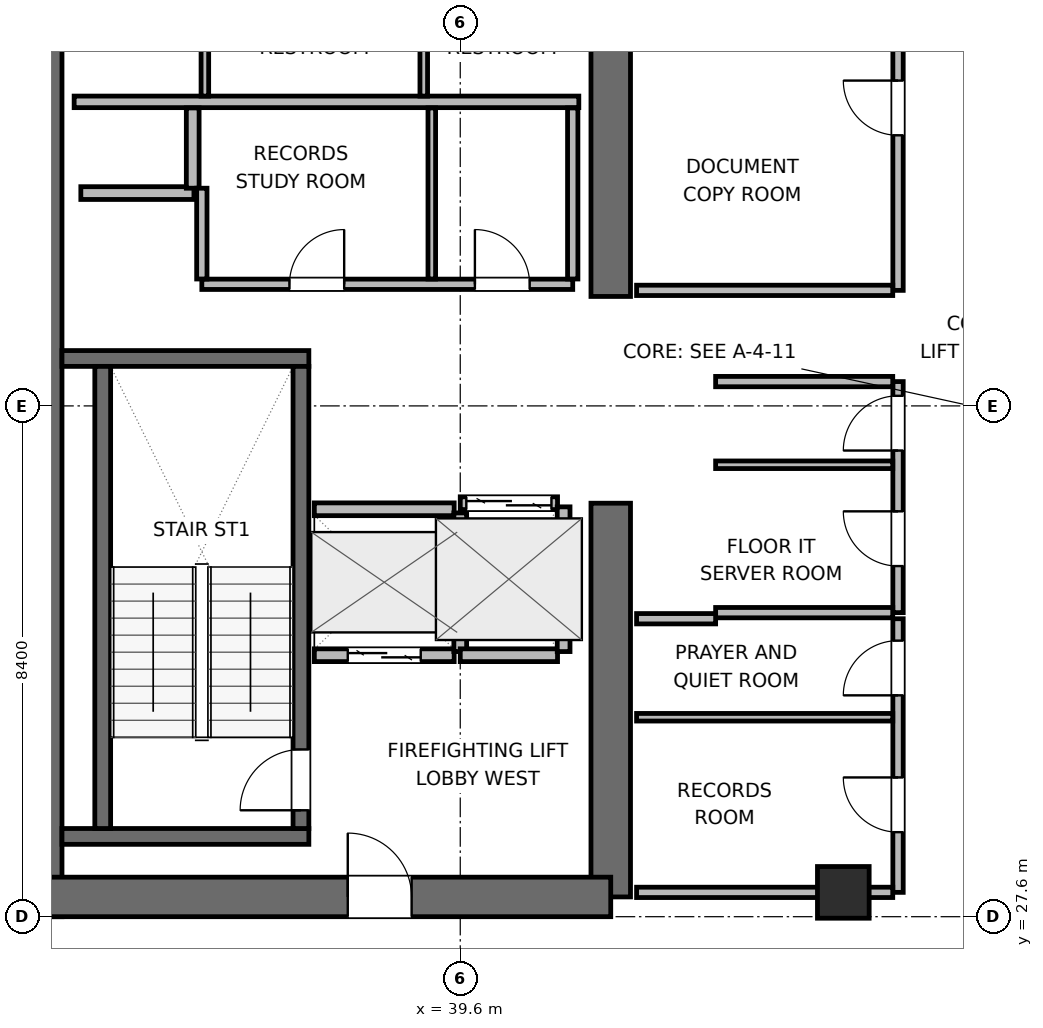
"""IFC4 building model, lengths in metres.
Left out: names, types, materials, properties, quantities, classifications, styles, units other than length and angle.
Written with IfcOpenShell. Run it as: python <this file> out.ifc"""

import sys

from ifc_helpers import new_model, si_unit, direction, frame, frame_2d, origin, origin_2d, place, context, subcontext, project, spatial, rectangle, extrude, element, fill, save


model = new_model("IFC4")
c1 = context("Model", 3, precision=1e-05, world=origin(), true_north=direction((0.0, 1.0)))
c2 = subcontext(c1, "Body", "Model", "MODEL_VIEW")
j1 = project(units=[si_unit("LENGTHUNIT", "METRE"), si_unit("PLANEANGLEUNIT", "RADIAN")], contexts=[c1])
p1 = place(None, origin())
s1 = spatial("IfcSite", under=j1, at=p1, CompositionType="ELEMENT")
p2 = place(p1, origin())
s2 = spatial("IfcBuilding", under=s1, at=p2, CompositionType="ELEMENT")
p3 = place(p2, frame((0.0, 0.0, 231.0)))
s3 = spatial("IfcBuildingStorey", under=s2, at=p3, CompositionType="ELEMENT", Elevation=231.0)
p4 = place(p3, frame((32.725, 27.6, 0.0), z_axis=(0.0, 0.0, 1.0), x_axis=(0.0, 1.0, 0.0)))
e1 = element("IfcWall", 1, at=p4, inside=s3, PredefinedType="SHEAR", context=c2, shape_type="SweptSolid", body=[
    extrude(rectangle(XDim=16.8, YDim=0.65, at=frame_2d((8.4, 0.0))), origin(), (0.0, 0.0, 1.0), 3.9),
])
p5 = place(p3, frame((42.075, 27.925, 0.0), z_axis=(0.0, 0.0, 1.0), x_axis=(0.0, 1.0, 0.0)))
e2 = element("IfcWall", 2, at=p5, inside=s3, PredefinedType="SHEAR", context=c2, shape_type="SweptSolid", body=[
    extrude(rectangle(XDim=6.475, YDim=0.65, at=frame_2d((3.237, 0.0))), origin(), (0.0, 0.0, 1.0), 3.9),
])
p6 = place(p3, frame((42.075, 37.8, 0.0), z_axis=(0.0, 0.0, 1.0), x_axis=(0.0, 1.0, 0.0)))
e3 = element("IfcWall", 3, at=p6, inside=s3, PredefinedType="SHEAR", context=c2, shape_type="SweptSolid", body=[
    extrude(rectangle(XDim=6.275, YDim=0.65, at=frame_2d((3.137, 0.0))), origin(), (0.0, 0.0, 1.0), 3.9),
])
p7 = place(p3, frame((32.725, 27.925, 0.0), z_axis=(0.0, 0.0, 1.0), x_axis=(1.0, 0.0, 0.0)))
e4 = element("IfcWall", 4, at=p7, inside=s3, PredefinedType="SHEAR", context=c2, shape_type="SweptSolid", body=[
    extrude(rectangle(XDim=9.35, YDim=0.65, at=frame_2d((4.675, 0.0))), origin(), (0.0, 0.0, 1.0), 3.9),
])
p8 = place(p7, frame((5.025, 0.0, 0.0)))
e5 = element("IfcOpeningElement", 5, at=p8, cuts=e4, PredefinedType="OPENING", context=c2, shape_type="SweptSolid", body=[
    extrude(rectangle(XDim=1.05, YDim=2.04, at=frame_2d((0.525, 1.02))), frame((0.0, 0.335, 0.0), z_axis=(0.0, -1.0, 0.0), x_axis=(1.0, 0.0, 0.0)), (0.0, 0.0, 1.0), 0.67),
])
for number, where, z_axis, x_axis in (
    (6, (33.05, 28.92, 0.0), (0.0, 0.0, 1.0), (1.0, 0.0, 0.0)),
    (7, (33.05, 36.78, 0.0), (0.0, 0.0, 1.0), (1.0, 0.0, 0.0)),
):
    element("IfcWall", number, at=place(p3, frame(where, z_axis=z_axis, x_axis=x_axis)), inside=s3, PredefinedType="SHEAR", context=c2, shape_type="SweptSolid", body=[
        extrude(rectangle(XDim=4.06, YDim=0.26, at=frame_2d((2.03, 0.0))), origin(), (0.0, 0.0, 1.0), 3.9),
    ])
p9 = place(p3, frame((33.72, 29.05, 0.0), z_axis=(0.0, 0.0, 1.0), x_axis=(0.0, 1.0, 0.0)))
e8 = element("IfcWall", 8, at=p9, inside=s3, PredefinedType="SHEAR", context=c2, shape_type="SweptSolid", body=[
    extrude(rectangle(XDim=7.6, YDim=0.26, at=frame_2d((3.8, 0.0))), origin(), (0.0, 0.0, 1.0), 3.9),
])
p10 = place(p3, frame((36.98, 29.05, 0.0), z_axis=(0.0, 0.0, 1.0), x_axis=(0.0, 1.0, 0.0)))
e9 = element("IfcWall", 9, at=p10, inside=s3, PredefinedType="SHEAR", context=c2, shape_type="SweptSolid", body=[
    extrude(rectangle(XDim=7.6, YDim=0.26, at=frame_2d((3.8, 0.0))), origin(), (0.0, 0.0, 1.0), 3.9),
])
p11 = place(p10, frame((0.3, 0.0, 0.0)))
e10 = element("IfcOpeningElement", 10, at=p11, cuts=e9, PredefinedType="OPENING", context=c2, shape_type="SweptSolid", body=[
    extrude(rectangle(XDim=1.0, YDim=2.04, at=frame_2d((0.5, 1.02))), frame((0.0, 0.14, 0.0), z_axis=(0.0, -1.0, 0.0), x_axis=(1.0, 0.0, 0.0)), (0.0, 0.0, 1.0), 0.28),
])
p12 = place(p3, frame((45.9, 28.0, 0.0), z_axis=(0.0, 0.0, 1.0), x_axis=(1.0, 0.0, 0.0)))
e11 = element("IfcColumn", 11, at=p12, inside=s3, PredefinedType="COLUMN", context=c2, shape_type="SweptSolid", body=[
    extrude(rectangle(XDim=0.85, YDim=0.85, at=origin_2d()), origin(), (0.0, 0.0, 1.0), 3.9),
])
p13 = place(p3, frame((33.25, 41.0, 0.0), z_axis=(0.0, 0.0, 1.0), x_axis=(1.0, 0.0, 0.0)))
e12 = element("IfcWall", 12, at=p13, inside=s3, PredefinedType="PLUMBINGWALL", context=c2, shape_type="SweptSolid", body=[
    extrude(rectangle(XDim=8.3, YDim=0.19, at=frame_2d((4.15, 0.0))), origin(), (0.0, 0.0, 1.0), 3.68),
])
for number, where, z_axis, x_axis in (
    (13, (35.4, 41.095, 0.0), (0.0, 0.0, 1.0), (0.0, 1.0, 0.0)),
    (14, (39.0, 41.095, 0.0), (0.0, 0.0, 1.0), (0.0, 1.0, 0.0)),
):
    element("IfcWall", number, at=place(p3, frame(where, z_axis=z_axis, x_axis=x_axis)), inside=s3, PredefinedType="PARTITIONING", context=c2, shape_type="SweptSolid", body=[
        extrude(rectangle(XDim=2.455, YDim=0.125, at=frame_2d((1.228, 0.0))), origin(), (0.0, 0.0, 1.0), 3.68),
    ])
p14 = place(p3, frame((33.36, 39.5, 0.0), z_axis=(0.0, 0.0, 1.0), x_axis=(1.0, 0.0, 0.0)))
e15 = element("IfcWall", 15, at=p14, inside=s3, PredefinedType="PARTITIONING", context=c2, shape_type="SweptSolid", body=[
    extrude(rectangle(XDim=1.86, YDim=0.21, at=frame_2d((0.93, 0.0))), origin(), (0.0, 0.0, 1.0), 3.68),
])
p15 = place(p3, frame((35.2, 39.58, 0.0), z_axis=(0.0, 0.0, 1.0), x_axis=(0.0, 1.0, 0.0)))
e16 = element("IfcWall", 16, at=p15, inside=s3, PredefinedType="PARTITIONING", context=c2, shape_type="SweptSolid", body=[
    extrude(rectangle(XDim=1.32, YDim=0.21, at=frame_2d((0.66, 0.0))), origin(), (0.0, 0.0, 1.0), 3.68),
])
p16 = place(p3, frame((37.2, 31.9, 0.0), z_axis=(0.0, 0.0, 1.0), x_axis=(1.0, 0.0, 0.0)))
e17 = element("IfcWall", 17, at=p16, inside=s3, PredefinedType="PARTITIONING", context=c2, shape_type="SweptSolid", body=[
    extrude(rectangle(XDim=2.3, YDim=0.21, at=frame_2d((1.15, 0.0))), origin(), (0.0, 0.0, 1.0), 3.68),
])
p17 = place(p16, frame((0.55, 0.0, 0.0)))
e18 = element("IfcOpeningElement", 18, at=p17, cuts=e17, PredefinedType="OPENING", context=c2, shape_type="SweptSolid", body=[
    extrude(rectangle(XDim=1.2, YDim=2.04, at=frame_2d((0.6, 1.02))), frame((0.0, 0.115, 0.0), z_axis=(0.0, -1.0, 0.0), x_axis=(1.0, 0.0, 0.0)), (0.0, 0.0, 1.0), 0.23),
])
p18 = place(p3, frame((37.2, 34.3, 0.0), z_axis=(0.0, 0.0, 1.0), x_axis=(1.0, 0.0, 0.0)))
e19 = element("IfcWall", 19, at=p18, inside=s3, PredefinedType="PARTITIONING", context=c2, shape_type="SweptSolid", body=[
    extrude(rectangle(XDim=2.3, YDim=0.21, at=frame_2d((1.15, 0.0))), origin(), (0.0, 0.0, 1.0), 3.68),
])
p19 = place(p3, frame((39.6, 31.96, 0.0), z_axis=(0.0, 0.0, 1.0), x_axis=(0.0, 1.0, 0.0)))
e20 = element("IfcWall", 20, at=p19, inside=s3, PredefinedType="PARTITIONING", context=c2, shape_type="SweptSolid", body=[
    extrude(rectangle(XDim=2.28, YDim=0.21, at=frame_2d((1.14, 0.0))), origin(), (0.0, 0.0, 1.0), 3.68),
])
p20 = place(p3, frame((39.6, 34.4, 0.0), z_axis=(0.0, 0.0, 1.0), x_axis=(1.0, 0.0, 0.0)))
e21 = element("IfcWall", 21, at=p20, inside=s3, PredefinedType="PARTITIONING", context=c2, shape_type="SweptSolid", body=[
    extrude(rectangle(XDim=1.6, YDim=0.21, at=frame_2d((0.8, 0.0))), origin(), (0.0, 0.0, 1.0), 3.68),
])
p21 = place(p20, frame((0.1, 0.0, 0.0)))
e22 = element("IfcOpeningElement", 22, at=p21, cuts=e21, PredefinedType="OPENING", context=c2, shape_type="SweptSolid", body=[
    extrude(rectangle(XDim=1.4, YDim=2.06, at=frame_2d((0.7, 1.03))), frame((0.0, 0.115, 0.0), z_axis=(0.0, -1.0, 0.0), x_axis=(1.0, 0.0, 0.0)), (0.0, 0.0, 1.0), 0.23),
])
p22 = place(p3, frame((39.6, 31.9, 0.0), z_axis=(0.0, 0.0, 1.0), x_axis=(1.0, 0.0, 0.0)))
e23 = element("IfcWall", 23, at=p22, inside=s3, PredefinedType="PARTITIONING", context=c2, shape_type="SweptSolid", body=[
    extrude(rectangle(XDim=1.6, YDim=0.21, at=frame_2d((0.8, 0.0))), origin(), (0.0, 0.0, 1.0), 3.68),
])
p23 = place(p3, frame((41.3, 31.96, 0.0), z_axis=(0.0, 0.0, 1.0), x_axis=(0.0, 1.0, 0.0)))
e24 = element("IfcWall", 24, at=p23, inside=s3, PredefinedType="PARTITIONING", context=c2, shape_type="SweptSolid", body=[
    extrude(rectangle(XDim=2.38, YDim=0.21, at=frame_2d((1.19, 0.0))), origin(), (0.0, 0.0, 1.0), 3.68),
])
p24 = place(p3, frame((35.35, 38.0, 0.0), z_axis=(0.0, 0.0, 1.0), x_axis=(1.0, 0.0, 0.0)))
e25 = element("IfcWall", 25, at=p24, inside=s3, PredefinedType="PARTITIONING", context=c2, shape_type="SweptSolid", body=[
    extrude(rectangle(XDim=6.1, YDim=0.17, at=frame_2d((3.05, 0.0))), origin(), (0.0, 0.0, 1.0), 3.68),
])
p25 = place(p24, frame((1.441, 0.0, 0.0)))
e26 = element("IfcOpeningElement", 26, at=p25, cuts=e25, PredefinedType="OPENING", context=c2, shape_type="SweptSolid", body=[
    extrude(rectangle(XDim=0.9, YDim=2.02, at=frame_2d((0.45, 1.01))), frame((0.0, 0.095, 0.0), z_axis=(0.0, -1.0, 0.0), x_axis=(1.0, 0.0, 0.0)), (0.0, 0.0, 1.0), 0.19),
])
p26 = place(p24, frame((4.491, 0.0, 0.0)))
e27 = element("IfcOpeningElement", 27, at=p26, cuts=e25, PredefinedType="OPENING", context=c2, shape_type="SweptSolid", body=[
    extrude(rectangle(XDim=0.9, YDim=2.02, at=frame_2d((0.45, 1.01))), frame((0.0, 0.095, 0.0), z_axis=(0.0, -1.0, 0.0), x_axis=(1.0, 0.0, 0.0)), (0.0, 0.0, 1.0), 0.19),
])
p27 = place(p3, frame((35.35, 38.087, 0.0), z_axis=(0.0, 0.0, 1.0), x_axis=(0.0, 1.0, 0.0)))
e28 = element("IfcWall", 28, at=p27, inside=s3, PredefinedType="PARTITIONING", context=c2, shape_type="SweptSolid", body=[
    extrude(rectangle(XDim=1.493, YDim=0.17, at=frame_2d((0.747, 0.0))), origin(), (0.0, 0.0, 1.0), 3.68),
])
p28 = place(p3, frame((41.45, 38.087, 0.0), z_axis=(0.0, 0.0, 1.0), x_axis=(0.0, 1.0, 0.0)))
e29 = element("IfcWall", 29, at=p28, inside=s3, PredefinedType="PARTITIONING", context=c2, shape_type="SweptSolid", body=[
    extrude(rectangle(XDim=2.813, YDim=0.17, at=frame_2d((1.406, 0.0))), origin(), (0.0, 0.0, 1.0), 3.68),
])
p29 = place(p3, frame((39.132, 38.087, 0.0), z_axis=(0.0, 0.0, 1.0), x_axis=(0.0, 1.0, 0.0)))
e30 = element("IfcWall", 30, at=p29, inside=s3, PredefinedType="PARTITIONING", context=c2, shape_type="SweptSolid", body=[
    extrude(rectangle(XDim=2.813, YDim=0.125, at=frame_2d((1.406, 0.0))), origin(), (0.0, 0.0, 1.0), 3.68),
])
p30 = place(p3, frame((46.8, 32.6, 0.0), z_axis=(0.0, 0.0, 1.0), x_axis=(0.0, 1.0, 0.0)))
e31 = element("IfcWall", 31, at=p30, inside=s3, PredefinedType="PARTITIONING", context=c2, shape_type="SweptSolid", body=[
    extrude(rectangle(XDim=3.8, YDim=0.17, at=frame_2d((1.9, 0.0))), origin(), (0.0, 0.0, 1.0), 3.68),
])
p31 = place(p30, frame((0.766, 0.0, 0.0)))
e32 = element("IfcOpeningElement", 32, at=p31, cuts=e31, PredefinedType="OPENING", context=c2, shape_type="SweptSolid", body=[
    extrude(rectangle(XDim=0.9, YDim=2.02, at=frame_2d((0.45, 1.01))), frame((0.0, 0.095, 0.0), z_axis=(0.0, -1.0, 0.0), x_axis=(1.0, 0.0, 0.0)), (0.0, 0.0, 1.0), 0.19),
])
p32 = place(p30, frame((2.666, 0.0, 0.0)))
e33 = element("IfcOpeningElement", 33, at=p32, cuts=e31, PredefinedType="OPENING", context=c2, shape_type="SweptSolid", body=[
    extrude(rectangle(XDim=0.9, YDim=2.02, at=frame_2d((0.45, 1.01))), frame((0.0, 0.095, 0.0), z_axis=(0.0, -1.0, 0.0), x_axis=(1.0, 0.0, 0.0)), (0.0, 0.0, 1.0), 0.19),
])
for number, where, z_axis, x_axis in (
    (34, (43.8, 32.6, 0.0), (0.0, 0.0, 1.0), (1.0, 0.0, 0.0)),
    (35, (43.8, 36.4, 0.0), (0.0, 0.0, 1.0), (1.0, 0.0, 0.0)),
):
    element("IfcWall", number, at=place(p3, frame(where, z_axis=z_axis, x_axis=x_axis)), inside=s3, PredefinedType="PARTITIONING", context=c2, shape_type="SweptSolid", body=[
        extrude(rectangle(XDim=2.913, YDim=0.17, at=frame_2d((1.457, 0.0))), origin(), (0.0, 0.0, 1.0), 3.68),
    ])
p33 = place(p3, frame((43.8, 35.032, 0.0), z_axis=(0.0, 0.0, 1.0), x_axis=(1.0, 0.0, 0.0)))
e36 = element("IfcWall", 36, at=p33, inside=s3, PredefinedType="PARTITIONING", context=c2, shape_type="SweptSolid", body=[
    extrude(rectangle(XDim=2.913, YDim=0.125, at=frame_2d((1.457, 0.0))), origin(), (0.0, 0.0, 1.0), 3.68),
])
p34 = place(p3, frame((46.8, 28.0, 0.0), z_axis=(0.0, 0.0, 1.0), x_axis=(0.0, 1.0, 0.0)))
e37 = element("IfcWall", 37, at=p34, inside=s3, PredefinedType="PARTITIONING", context=c2, shape_type="SweptSolid", body=[
    extrude(rectangle(XDim=4.5, YDim=0.17, at=frame_2d((2.25, 0.0))), origin(), (0.0, 0.0, 1.0), 3.68),
])
p35 = place(p34, frame((0.99, 0.0, 0.0)))
e38 = element("IfcOpeningElement", 38, at=p35, cuts=e37, PredefinedType="OPENING", context=c2, shape_type="SweptSolid", body=[
    extrude(rectangle(XDim=0.9, YDim=2.02, at=frame_2d((0.45, 1.01))), frame((0.0, 0.095, 0.0), z_axis=(0.0, -1.0, 0.0), x_axis=(1.0, 0.0, 0.0)), (0.0, 0.0, 1.0), 0.19),
])
p36 = place(p34, frame((3.24, 0.0, 0.0)))
e39 = element("IfcOpeningElement", 39, at=p36, cuts=e37, PredefinedType="OPENING", context=c2, shape_type="SweptSolid", body=[
    extrude(rectangle(XDim=0.9, YDim=2.02, at=frame_2d((0.45, 1.01))), frame((0.0, 0.095, 0.0), z_axis=(0.0, -1.0, 0.0), x_axis=(1.0, 0.0, 0.0)), (0.0, 0.0, 1.0), 0.19),
])
p37 = place(p3, frame((42.5, 28.0, 0.0), z_axis=(0.0, 0.0, 1.0), x_axis=(1.0, 0.0, 0.0)))
e40 = element("IfcWall", 40, at=p37, inside=s3, PredefinedType="PARTITIONING", context=c2, shape_type="SweptSolid", body=[
    extrude(rectangle(XDim=4.213, YDim=0.17, at=frame_2d((2.106, 0.0))), origin(), (0.0, 0.0, 1.0), 2.765),
])
p38 = place(p3, frame((42.5, 32.5, 0.0), z_axis=(0.0, 0.0, 1.0), x_axis=(1.0, 0.0, 0.0)))
e41 = element("IfcWall", 41, at=p38, inside=s3, PredefinedType="PARTITIONING", context=c2, shape_type="SweptSolid", body=[
    extrude(rectangle(XDim=1.3, YDim=0.17, at=frame_2d((0.65, 0.0))), origin(), (0.0, 0.0, 1.0), 3.68),
])
p39 = place(p3, frame((42.5, 30.88, 0.0), z_axis=(0.0, 0.0, 1.0), x_axis=(1.0, 0.0, 0.0)))
e42 = element("IfcWall", 42, at=p39, inside=s3, PredefinedType="PARTITIONING", context=c2, shape_type="SweptSolid", body=[
    extrude(rectangle(XDim=4.213, YDim=0.125, at=frame_2d((2.106, 0.0))), origin(), (0.0, 0.0, 1.0), 3.68),
])
p40 = place(p3, frame((46.8, 37.9, 0.0), z_axis=(0.0, 0.0, 1.0), x_axis=(0.0, 1.0, 0.0)))
e43 = element("IfcWall", 43, at=p40, inside=s3, PredefinedType="PARTITIONING", context=c2, shape_type="SweptSolid", body=[
    extrude(rectangle(XDim=6.0, YDim=0.17, at=frame_2d((3.0, 0.0))), origin(), (0.0, 0.0, 1.0), 3.68),
])
p41 = place(p40, frame((2.55, 0.0, 0.0)))
e44 = element("IfcOpeningElement", 44, at=p41, cuts=e43, PredefinedType="OPENING", context=c2, shape_type="SweptSolid", body=[
    extrude(rectangle(XDim=0.9, YDim=2.02, at=frame_2d((0.45, 1.01))), frame((0.0, 0.095, 0.0), z_axis=(0.0, -1.0, 0.0), x_axis=(1.0, 0.0, 0.0)), (0.0, 0.0, 1.0), 0.19),
])
p42 = place(p3, frame((42.5, 37.9, 0.0), z_axis=(0.0, 0.0, 1.0), x_axis=(1.0, 0.0, 0.0)))
e45 = element("IfcWall", 45, at=p42, inside=s3, PredefinedType="PARTITIONING", context=c2, shape_type="SweptSolid", body=[
    extrude(rectangle(XDim=4.213, YDim=0.17, at=frame_2d((2.106, 0.0))), origin(), (0.0, 0.0, 1.0), 3.68),
])
p43 = place(p11, origin())
e46 = element("IfcDoor", 46, at=p43, inside=s3, OperationType="SINGLE_SWING_LEFT", PredefinedType="DOOR", context=c2, shape_type="SweptSolid", body=[
    extrude(rectangle(XDim=1.0, YDim=2.04, at=frame_2d((0.5, 1.02))), frame((0.0, 0.025, 0.0), z_axis=(0.0, -1.0, 0.0), x_axis=(1.0, 0.0, 0.0)), (0.0, 0.0, 1.0), 0.05),
])
fill(e10, e46)
p44 = place(p17, origin())
e47 = element("IfcDoor", 47, at=p44, inside=s3, OperationType="DOUBLE_DOOR_SLIDING", PredefinedType="DOOR", context=c2, shape_type="SweptSolid", body=[
    extrude(rectangle(XDim=1.2, YDim=2.04, at=frame_2d((0.6, 1.02))), frame((0.0, 0.025, 0.0), z_axis=(0.0, -1.0, 0.0), x_axis=(1.0, 0.0, 0.0)), (0.0, 0.0, 1.0), 0.05),
])
fill(e18, e47)
p45 = place(p21, origin())
e48 = element("IfcDoor", 48, at=p45, inside=s3, OperationType="DOUBLE_DOOR_SLIDING", PredefinedType="DOOR", context=c2, shape_type="SweptSolid", body=[
    extrude(rectangle(XDim=1.4, YDim=2.06, at=frame_2d((0.7, 1.03))), frame((0.0, 0.025, 0.0), z_axis=(0.0, -1.0, 0.0), x_axis=(1.0, 0.0, 0.0)), (0.0, 0.0, 1.0), 0.05),
])
fill(e22, e48)
p46 = place(p8, origin())
e49 = element("IfcDoor", 49, at=p46, inside=s3, OperationType="SINGLE_SWING_LEFT", PredefinedType="DOOR", context=c2, shape_type="SweptSolid", body=[
    extrude(rectangle(XDim=1.05, YDim=2.04, at=frame_2d((0.525, 1.02))), frame((0.0, 0.025, 0.0), z_axis=(0.0, -1.0, 0.0), x_axis=(1.0, 0.0, 0.0)), (0.0, 0.0, 1.0), 0.05),
])
fill(e5, e49)
p47 = place(p25, origin())
e50 = element("IfcDoor", 50, at=p47, inside=s3, OperationType="SINGLE_SWING_RIGHT", PredefinedType="DOOR", context=c2, shape_type="SweptSolid", body=[
    extrude(rectangle(XDim=0.9, YDim=2.02, at=frame_2d((0.45, 1.01))), frame((0.0, 0.025, 0.0), z_axis=(0.0, -1.0, 0.0), x_axis=(1.0, 0.0, 0.0)), (0.0, 0.0, 1.0), 0.05),
])
fill(e26, e50)
p48 = place(p26, origin())
e51 = element("IfcDoor", 51, at=p48, inside=s3, OperationType="SINGLE_SWING_LEFT", PredefinedType="DOOR", context=c2, shape_type="SweptSolid", body=[
    extrude(rectangle(XDim=0.9, YDim=2.02, at=frame_2d((0.45, 1.01))), frame((0.0, 0.025, 0.0), z_axis=(0.0, -1.0, 0.0), x_axis=(1.0, 0.0, 0.0)), (0.0, 0.0, 1.0), 0.05),
])
fill(e27, e51)
p49 = place(p31, origin())
e52 = element("IfcDoor", 52, at=p49, inside=s3, OperationType="SINGLE_SWING_RIGHT", PredefinedType="DOOR", context=c2, shape_type="SweptSolid", body=[
    extrude(rectangle(XDim=0.9, YDim=2.02, at=frame_2d((0.45, 1.01))), frame((0.0, 0.025, 0.0), z_axis=(0.0, -1.0, 0.0), x_axis=(1.0, 0.0, 0.0)), (0.0, 0.0, 1.0), 0.05),
])
fill(e32, e52)
p50 = place(p32, origin())
e53 = element("IfcDoor", 53, at=p50, inside=s3, OperationType="SINGLE_SWING_LEFT", PredefinedType="DOOR", context=c2, shape_type="SweptSolid", body=[
    extrude(rectangle(XDim=0.9, YDim=2.02, at=frame_2d((0.45, 1.01))), frame((0.0, 0.025, 0.0), z_axis=(0.0, -1.0, 0.0), x_axis=(1.0, 0.0, 0.0)), (0.0, 0.0, 1.0), 0.05),
])
fill(e33, e53)
p51 = place(p35, origin())
e54 = element("IfcDoor", 54, at=p51, inside=s3, OperationType="SINGLE_SWING_RIGHT", PredefinedType="DOOR", context=c2, shape_type="SweptSolid", body=[
    extrude(rectangle(XDim=0.9, YDim=2.02, at=frame_2d((0.45, 1.01))), frame((0.0, 0.025, 0.0), z_axis=(0.0, -1.0, 0.0), x_axis=(1.0, 0.0, 0.0)), (0.0, 0.0, 1.0), 0.05),
])
fill(e38, e54)
p52 = place(p36, origin())
e55 = element("IfcDoor", 55, at=p52, inside=s3, OperationType="SINGLE_SWING_LEFT", PredefinedType="DOOR", context=c2, shape_type="SweptSolid", body=[
    extrude(rectangle(XDim=0.9, YDim=2.02, at=frame_2d((0.45, 1.01))), frame((0.0, 0.025, 0.0), z_axis=(0.0, -1.0, 0.0), x_axis=(1.0, 0.0, 0.0)), (0.0, 0.0, 1.0), 0.05),
])
fill(e39, e55)
p53 = place(p41, origin())
e56 = element("IfcDoor", 56, at=p53, inside=s3, OperationType="SINGLE_SWING_RIGHT", PredefinedType="DOOR", context=c2, shape_type="SweptSolid", body=[
    extrude(rectangle(XDim=0.9, YDim=2.02, at=frame_2d((0.45, 1.01))), frame((0.0, 0.025, 0.0), z_axis=(0.0, -1.0, 0.0), x_axis=(1.0, 0.0, 0.0)), (0.0, 0.0, 1.0), 0.05),
])
fill(e44, e56)
save(model, sys.argv[1])
